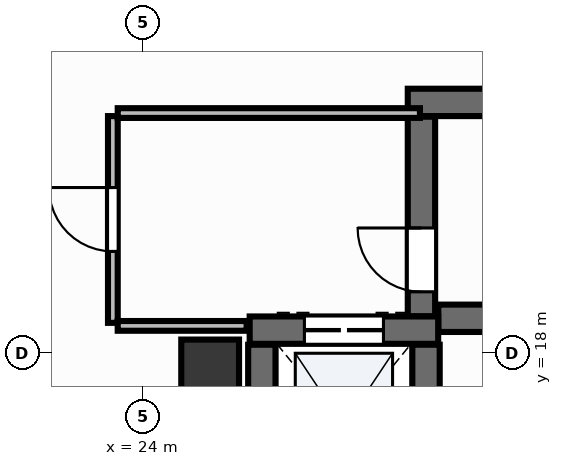
"""IFC4 building model, lengths in metres.
Left out: names, types, materials, properties, quantities, classifications, styles, units other than length and angle.
Written with IfcOpenShell. Run it as: python <this file> out.ifc"""

import sys

from ifc_helpers import new_model, si_unit, direction, frame, frame_2d, origin, origin_2d, place, context, subcontext, project, spatial, rectangle, extrude, element, fill, save


model = new_model("IFC4")
c1 = context("Model", 3, precision=1e-05, world=origin(), true_north=direction((0.0, 1.0)))
c2 = subcontext(c1, "Body", "Model", "MODEL_VIEW")
j1 = project(units=[si_unit("LENGTHUNIT", "METRE"), si_unit("PLANEANGLEUNIT", "RADIAN")], contexts=[c1])
p1 = place(None, origin())
s1 = spatial("IfcSite", under=j1, at=p1, CompositionType="ELEMENT")
p2 = place(p1, origin())
s2 = spatial("IfcBuilding", under=s1, at=p2, CompositionType="ELEMENT")
p3 = place(p2, frame((0.0, 0.0, -4.5)))
s3 = spatial("IfcBuildingStorey", under=s2, at=p3, CompositionType="ELEMENT", Elevation=-4.5)
p4 = place(p3, frame((28.852, 18.575, 0.0), z_axis=(0.0, 0.0, 1.0), x_axis=(1.0, 0.0, 0.0)))
e1 = element("IfcWall", 1, at=p4, inside=s3, PredefinedType="SHEAR", context=c2, shape_type="SweptSolid", body=[
    extrude(rectangle(XDim=8.248, YDim=0.45, at=frame_2d((4.124, 0.0))), origin(), (0.0, 0.0, 1.0), 4.18),
])
p5 = place(p3, frame((28.35, 22.125, 0.0), z_axis=(0.0, 0.0, 1.0), x_axis=(1.0, 0.0, 0.0)))
e2 = element("IfcWall", 2, at=p5, inside=s3, PredefinedType="SHEAR", context=c2, shape_type="SweptSolid", body=[
    extrude(rectangle(XDim=8.75, YDim=0.45, at=frame_2d((4.375, 0.0))), origin(), (0.0, 0.0, 1.0), 4.18),
])
p6 = place(p3, frame((28.575, 18.607, 0.0), z_axis=(0.0, 0.0, 1.0), x_axis=(0.0, 1.0, 0.0)))
e3 = element("IfcWall", 3, at=p6, inside=s3, PredefinedType="SHEAR", context=c2, shape_type="SweptSolid", body=[
    extrude(rectangle(XDim=3.283, YDim=0.45, at=frame_2d((1.642, 0.0))), origin(), (0.0, 0.0, 1.0), 4.18),
])
p7 = place(p6, frame((0.403, 0.0, 0.0)))
e4 = element("IfcOpeningElement", 4, at=p7, cuts=e3, PredefinedType="OPENING", context=c2, shape_type="SweptSolid", body=[
    extrude(rectangle(XDim=1.05, YDim=2.15, at=frame_2d((0.525, 1.075))), frame((0.0, 0.24, 0.0), z_axis=(0.0, -1.0, 0.0), x_axis=(1.0, 0.0, 0.0)), (0.0, 0.0, 1.0), 0.48),
])
p8 = place(p3, frame((25.75, 18.38, 0.0), z_axis=(0.0, 0.0, 1.0), x_axis=(1.0, 0.0, 0.0)))
e5 = element("IfcWall", 5, at=p8, inside=s3, PredefinedType="SHEAR", context=c2, shape_type="SweptSolid", body=[
    extrude(rectangle(XDim=3.1, YDim=0.45, at=frame_2d((1.55, 0.0))), origin(), (0.0, 0.0, 1.0), 4.18),
])
p9 = place(p8, frame((0.9, 0.0, 0.0)))
e6 = element("IfcOpeningElement", 6, at=p9, cuts=e5, PredefinedType="OPENING", context=c2, shape_type="SweptSolid", body=[
    extrude(rectangle(XDim=1.3, YDim=2.2, at=frame_2d((0.65, 1.1))), frame((0.0, 0.24, 0.0), z_axis=(0.0, -1.0, 0.0), x_axis=(1.0, 0.0, 0.0)), (0.0, 0.0, 1.0), 0.48),
])
for number, where, z_axis, x_axis in (
    (7, (25.95, 15.44, 0.0), (0.0, 0.0, 1.0), (0.0, 1.0, 0.0)),
    (8, (28.65, 15.44, 0.0), (0.0, 0.0, 1.0), (0.0, 1.0, 0.0)),
):
    element("IfcWall", number, at=place(p3, frame(where, z_axis=z_axis, x_axis=x_axis)), inside=s3, PredefinedType="SHEAR", context=c2, shape_type="SweptSolid", body=[
        extrude(rectangle(XDim=2.7, YDim=0.45, at=frame_2d((1.35, 0.0))), origin(), (0.0, 0.0, 1.0), 4.18),
    ])
p10 = place(p3, frame((25.1, 17.75, -0.0), z_axis=(0.0, 0.0, 1.0), x_axis=(1.0, 0.0, 0.0)))
e9 = element("IfcColumn", 9, at=p10, inside=s3, PredefinedType="PILASTER", context=c2, shape_type="SweptSolid", body=[
    extrude(rectangle(XDim=0.95, YDim=0.95, at=origin_2d()), origin(), (0.0, 0.0, 1.0), 4.181),
])
p11 = place(p3, frame((23.5, 18.5, 0.0), z_axis=(0.0, 0.0, 1.0), x_axis=(0.0, 1.0, 0.0)))
e10 = element("IfcWall", 10, at=p11, inside=s3, PredefinedType="PARTITIONING", context=c2, shape_type="SweptSolid", body=[
    extrude(rectangle(XDim=3.4, YDim=0.16, at=frame_2d((1.7, 0.0))), origin(), (0.0, 0.0, 1.0), 3.04),
])
p12 = place(p11, frame((1.175, 0.0, 0.0)))
e11 = element("IfcOpeningElement", 11, at=p12, cuts=e10, PredefinedType="OPENING", context=c2, shape_type="SweptSolid", body=[
    extrude(rectangle(XDim=1.05, YDim=2.15, at=frame_2d((0.525, 1.075))), frame((0.0, 0.095, 0.0), z_axis=(0.0, -1.0, 0.0), x_axis=(1.0, 0.0, 0.0)), (0.0, 0.0, 1.0), 0.19),
])
p13 = place(p3, frame((23.58, 21.95, 0.0), z_axis=(0.0, 0.0, 1.0), x_axis=(1.0, 0.0, 0.0)))
e12 = element("IfcWall", 12, at=p13, inside=s3, PredefinedType="PARTITIONING", context=c2, shape_type="SweptSolid", body=[
    extrude(rectangle(XDim=4.97, YDim=0.16, at=frame_2d((2.485, 0.0))), origin(), (0.0, 0.0, 1.0), 3.04),
])
p14 = place(p3, frame((23.58, 18.45, 0.0), z_axis=(0.0, 0.0, 1.0), x_axis=(1.0, 0.0, 0.0)))
e13 = element("IfcWall", 13, at=p14, inside=s3, PredefinedType="PARTITIONING", context=c2, shape_type="SweptSolid", body=[
    extrude(rectangle(XDim=2.12, YDim=0.16, at=frame_2d((1.06, 0.0))), origin(), (0.0, 0.0, 1.0), 3.04),
])
p15 = place(p7, origin())
e14 = element("IfcDoor", 14, at=p15, inside=s3, OperationType="SINGLE_SWING_RIGHT", PredefinedType="DOOR", context=c2, shape_type="SweptSolid", body=[
    extrude(rectangle(XDim=1.05, YDim=2.15, at=frame_2d((0.525, 1.075))), frame((0.0, 0.025, 0.0), z_axis=(0.0, -1.0, 0.0), x_axis=(1.0, 0.0, 0.0)), (0.0, 0.0, 1.0), 0.05),
])
fill(e4, e14)
p16 = place(p9, origin())
e15 = element("IfcDoor", 15, at=p16, inside=s3, OperationType="DOUBLE_DOOR_SLIDING", PredefinedType="DOOR", context=c2, shape_type="SweptSolid", body=[
    extrude(rectangle(XDim=1.3, YDim=2.2, at=frame_2d((0.65, 1.1))), frame((0.0, 0.025, 0.0), z_axis=(0.0, -1.0, 0.0), x_axis=(1.0, 0.0, 0.0)), (0.0, 0.0, 1.0), 0.05),
])
fill(e6, e15)
p17 = place(p12, origin())
e16 = element("IfcDoor", 16, at=p17, inside=s3, OperationType="SINGLE_SWING_RIGHT", PredefinedType="DOOR", context=c2, shape_type="SweptSolid", body=[
    extrude(rectangle(XDim=1.05, YDim=2.15, at=frame_2d((0.525, 1.075))), frame((0.0, 0.025, 0.0), z_axis=(0.0, -1.0, 0.0), x_axis=(1.0, 0.0, 0.0)), (0.0, 0.0, 1.0), 0.05),
])
fill(e11, e16)
save(model, sys.argv[1])
